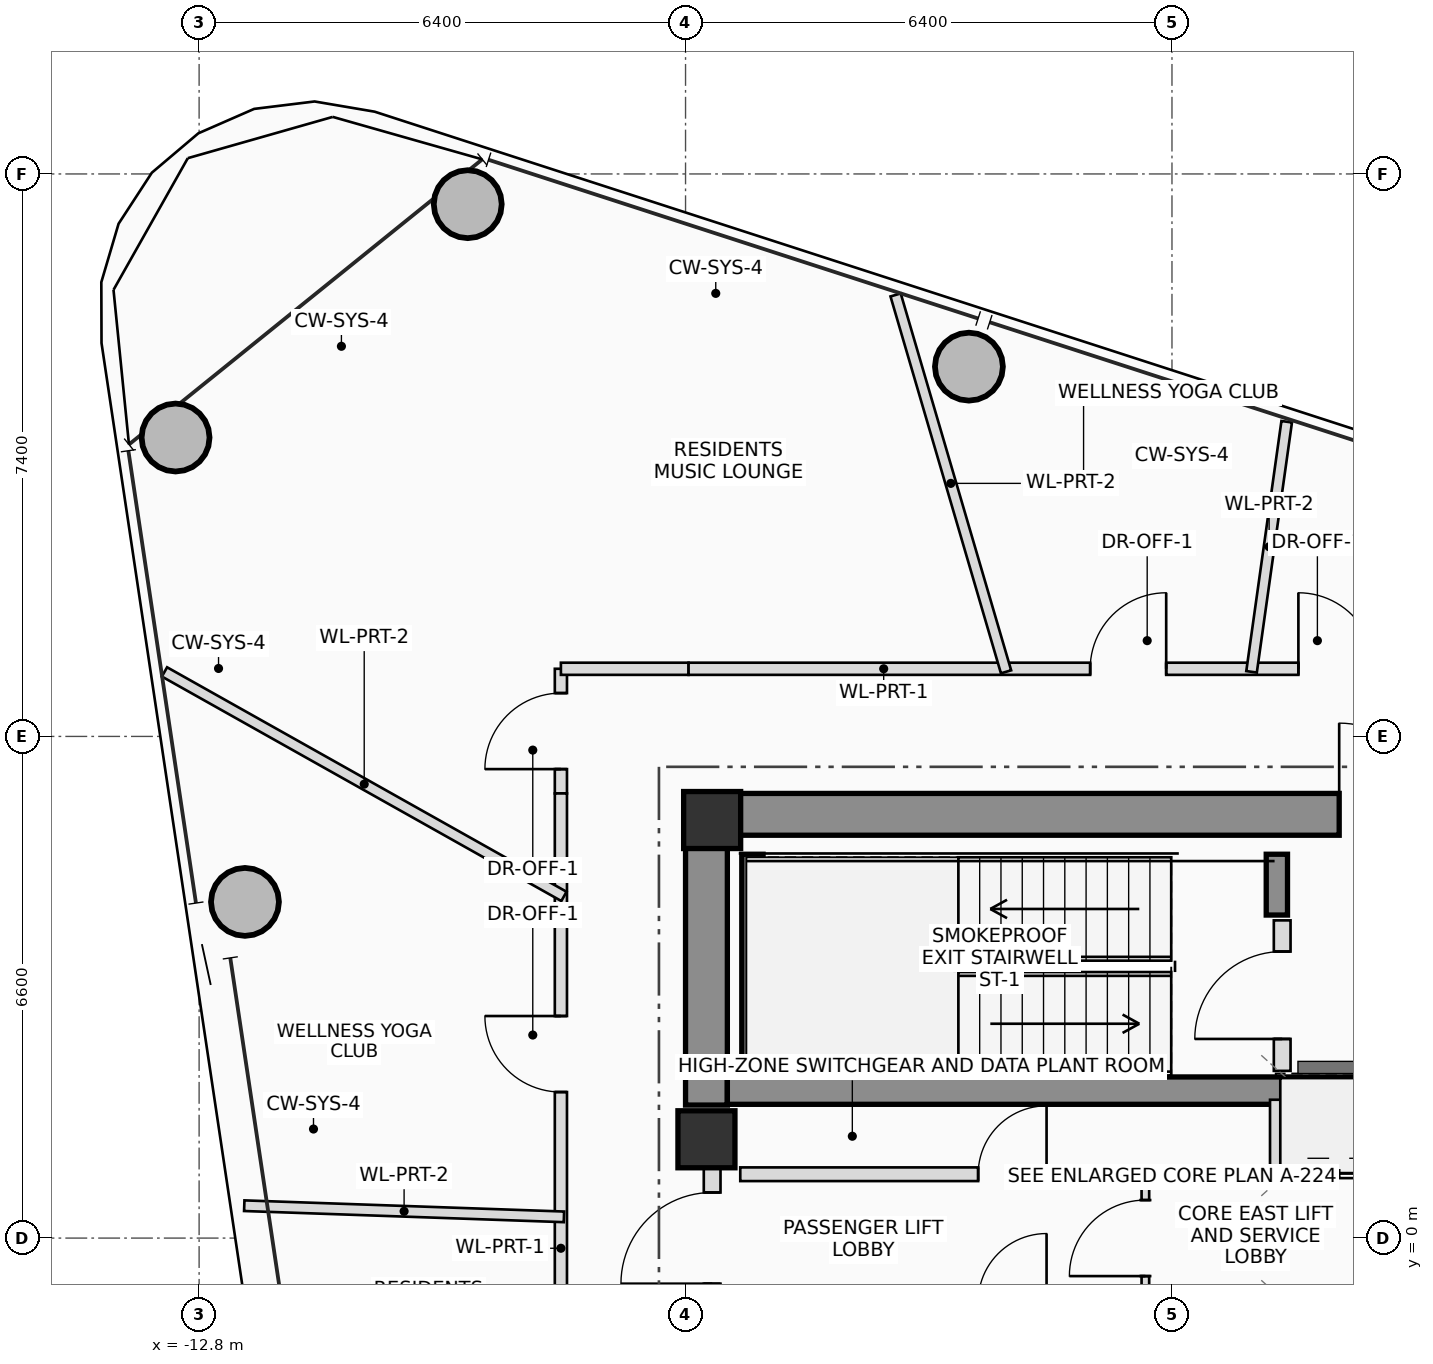
"""IFC4 building model, lengths in metres.
Left out: names, types, materials, properties, quantities, classifications, styles, units other than length and angle.
Written with IfcOpenShell. Run it as: python <this file> out.ifc"""

import sys

from ifc_helpers import new_model, si_unit, direction, frame, frame_2d, origin, origin_2d, place, context, subcontext, project, spatial, rectangle, hollow_circle, extrude, source, transform, mapped, element, fill, save


model = new_model("IFC4")
c1 = context("Model", 3, precision=1e-05, world=origin(), true_north=direction((0.0, 1.0)))
c2 = subcontext(c1, "Body", "Model", "MODEL_VIEW")
j1 = project(units=[si_unit("LENGTHUNIT", "METRE"), si_unit("PLANEANGLEUNIT", "RADIAN")], contexts=[c1])
p1 = place(None, origin())
s1 = spatial("IfcSite", under=j1, at=p1, CompositionType="ELEMENT")
p2 = place(p1, origin())
s2 = spatial("IfcBuilding", under=s1, at=p2, CompositionType="ELEMENT")
p3 = place(p2, frame((0.0, 0.0, 264.35)))
s3 = spatial("IfcBuildingStorey", under=s2, at=p3, CompositionType="ELEMENT", Elevation=264.35)
m1 = source(origin(), c2, "Body", "SweptSolid", [
    extrude(rectangle(XDim=0.75, YDim=0.75, at=origin_2d()), origin(), (0.0, 0.0, 1.0), 3.4),
])
p4 = place(p3, frame((-6.05, 5.5, 0.0), z_axis=(0.0, 0.0, 1.0), x_axis=(1.0, 0.0, 0.0)))
e1 = element("IfcColumn", 1, at=p4, inside=s3, PredefinedType="COLUMN", context=c2, shape_type="MappedRepresentation", body=[
    mapped(m1, transform((0.0, 0.0, 0.0), scale=1.0)),
])
p5 = place(p3, frame((-6.4, 5.575, 0.0), z_axis=(0.0, 0.0, 1.0), x_axis=(1.0, 0.0, 0.0)))
e2 = element("IfcWall", 2, at=p5, inside=s3, PredefinedType="SHEAR", context=c2, shape_type="SweptSolid", body=[
    extrude(rectangle(XDim=12.8, YDim=0.55, at=frame_2d((6.4, 0.0))), origin(), (0.0, 0.0, 1.0), 3.4),
])
p6 = place(p5, frame((8.6, 0.0, 0.0)))
e3 = element("IfcOpeningElement", 3, at=p6, cuts=e2, PredefinedType="OPENING", context=c2, shape_type="SweptSolid", body=[
    extrude(rectangle(XDim=1.2, YDim=2.2, at=frame_2d((0.6, 1.1))), frame((0.0, 0.285, 0.0), z_axis=(0.0, -1.0, 0.0), x_axis=(1.0, 0.0, 0.0)), (0.0, 0.0, 1.0), 0.57),
])
p7 = place(p3, frame((-6.125, 1.75, 0.0), z_axis=(0.0, 0.0, 1.0), x_axis=(0.0, 1.0, 0.0)))
e4 = element("IfcWall", 4, at=p7, inside=s3, PredefinedType="SHEAR", context=c2, shape_type="SweptSolid", body=[
    extrude(rectangle(XDim=3.55, YDim=0.55, at=frame_2d((1.775, 0.0))), origin(), (0.0, 0.0, 1.0), 3.4),
])
p8 = place(p3, frame((-5.85, 1.94, 0.0), z_axis=(0.0, 0.0, 1.0), x_axis=(1.0, 0.0, 0.0)))
e5 = element("IfcWall", 5, at=p8, inside=s3, PredefinedType="SHEAR", context=c2, shape_type="SweptSolid", body=[
    extrude(rectangle(XDim=11.7, YDim=0.36, at=frame_2d((5.85, 0.0))), origin(), (0.0, 0.0, 1.0), 3.4),
])
p9 = place(p3, frame((-5.52, 2.3, 0.0), z_axis=(0.0, 0.0, 1.0), x_axis=(0.0, 1.0, 0.0)))
e6 = element("IfcWall", 6, at=p9, inside=s3, PredefinedType="SHEAR", context=c2, shape_type="SweptSolid", body=[
    extrude(rectangle(XDim=2.75, YDim=0.28, at=frame_2d((1.375, 0.0))), origin(), (0.0, 0.0, 1.0), 3.4),
])
p10 = place(p3, frame((1.38, 4.25, 0.0), z_axis=(0.0, 0.0, 1.0), x_axis=(0.0, 1.0, 0.0)))
e7 = element("IfcWall", 7, at=p10, inside=s3, PredefinedType="SHEAR", context=c2, shape_type="SweptSolid", body=[
    extrude(rectangle(XDim=0.8, YDim=0.28, at=frame_2d((0.4, 0.0))), origin(), (0.0, 0.0, 1.0), 3.4),
])
p11 = place(p3, frame((-6.125, 1.3, 0.0), z_axis=(0.0, 0.0, 1.0), x_axis=(1.0, 0.0, 0.0)))
e8 = element("IfcColumn", 8, at=p11, inside=s3, PredefinedType="COLUMN", context=c2, shape_type="MappedRepresentation", body=[
    mapped(m1, transform((0.0, 0.0, 0.0), scale=1.0)),
])
m2 = source(origin(), c2, "Body", "SweptSolid", [
    extrude(hollow_circle(Radius=0.45, WallThickness=0.032, at=origin_2d()), origin(), (0.0, 0.0, 1.0), 3.4),
])
for number, where, z_axis, x_axis in (
    (9, (-2.672, 11.465, 0.0), (0.0, 0.0, 1.0), (1.0, 0.0, 0.0)),
    (10, (-9.266, 13.602, 0.0), (0.0, 0.0, 1.0), (1.0, 0.0, 0.0)),
    (11, (-13.11, 10.532, 0.0), (0.0, 0.0, 1.0), (1.0, 0.0, 0.0)),
    (12, (-12.197, 4.423, 0.0), (0.0, 0.0, 1.0), (1.0, 0.0, 0.0)),
):
    element("IfcColumn", number, at=place(p3, frame(where, z_axis=z_axis, x_axis=x_axis)), inside=s3, PredefinedType="COLUMN", context=c2, shape_type="MappedRepresentation", body=[
        mapped(m2, transform((0.0, 0.0, 0.0), scale=1.0)),
    ])
p12 = place(p3, frame((-6.05, -0.95, 0.0), z_axis=(0.0, 0.0, 1.0), x_axis=(0.0, 1.0, 0.0)))
e13 = element("IfcWall", 13, at=p12, inside=s3, PredefinedType="PLUMBINGWALL", context=c2, shape_type="SweptSolid", body=[
    extrude(rectangle(XDim=1.9, YDim=0.22, at=frame_2d((0.95, 0.0))), origin(), (0.0, 0.0, 1.0), 2.18),
])
p13 = place(p12, frame((0.35, 0.0, 0.0)))
e14 = element("IfcOpeningElement", 14, at=p13, cuts=e13, PredefinedType="OPENING", context=c2, shape_type="SweptSolid", body=[
    extrude(rectangle(XDim=1.2, YDim=2.2, at=frame_2d((0.6, 1.1))), frame((0.0, 0.12, 0.0), z_axis=(0.0, -1.0, 0.0), x_axis=(1.0, 0.0, 0.0)), (0.0, 0.0, 1.0), 0.24),
])
p14 = place(p3, frame((1.45, 2.2, 0.0), z_axis=(0.0, 0.0, 1.0), x_axis=(0.0, 1.0, 0.0)))
e15 = element("IfcWall", 15, at=p14, inside=s3, PredefinedType="PLUMBINGWALL", context=c2, shape_type="SweptSolid", body=[
    extrude(rectangle(XDim=1.98, YDim=0.22, at=frame_2d((0.99, 0.0))), origin(), (0.0, 0.0, 1.0), 3.2),
])
p15 = place(p14, frame((0.42, 0.0, 0.0)))
e16 = element("IfcOpeningElement", 16, at=p15, cuts=e15, PredefinedType="OPENING", context=c2, shape_type="SweptSolid", body=[
    extrude(rectangle(XDim=1.15, YDim=2.15, at=frame_2d((0.575, 1.075))), frame((0.0, 0.12, 0.0), z_axis=(0.0, -1.0, 0.0), x_axis=(1.0, 0.0, 0.0)), (0.0, 0.0, 1.0), 0.24),
])
p16 = place(p3, frame((-0.35, -0.84, 0.0), z_axis=(0.0, 0.0, 1.0), x_axis=(0.0, 1.0, 0.0)))
e17 = element("IfcWall", 17, at=p16, inside=s3, PredefinedType="PARTITIONING", context=c2, shape_type="SweptSolid", body=[
    extrude(rectangle(XDim=1.68, YDim=0.1, at=frame_2d((0.84, 0.0))), origin(), (0.0, 0.0, 1.0), 3.2),
])
p17 = place(p16, frame((0.34, 0.0, 0.0)))
e18 = element("IfcOpeningElement", 18, at=p17, cuts=e17, PredefinedType="OPENING", context=c2, shape_type="SweptSolid", body=[
    extrude(rectangle(XDim=1.0, YDim=2.25, at=frame_2d((0.5, 1.125))), frame((0.0, 0.06, 0.0), z_axis=(0.0, -1.0, 0.0), x_axis=(1.0, 0.0, 0.0)), (0.0, 0.0, 1.0), 0.12),
])
p18 = place(p3, frame((1.38, 0.84, 0.0), z_axis=(0.0, 0.0, 1.0), x_axis=(0.0, 1.0, 0.0)))
e19 = element("IfcWall", 19, at=p18, inside=s3, PredefinedType="PLUMBINGWALL", context=c2, shape_type="SweptSolid", body=[
    extrude(rectangle(XDim=0.98, YDim=0.18, at=frame_2d((0.49, 0.0))), origin(), (0.0, 0.0, 1.0), 3.2),
])
p19 = place(p3, frame((-5.68, 0.84, 0.0), z_axis=(0.0, 0.0, 1.0), x_axis=(1.0, 0.0, 0.0)))
e20 = element("IfcWall", 20, at=p19, inside=s3, PredefinedType="PLUMBINGWALL", context=c2, shape_type="SweptSolid", body=[
    extrude(rectangle(XDim=11.33, YDim=0.18, at=frame_2d((5.665, 0.0))), origin(), (0.0, 0.0, 1.0), 3.2),
])
p20 = place(p19, frame((3.13, 0.0, 0.0)))
e21 = element("IfcOpeningElement", 21, at=p20, cuts=e20, PredefinedType="OPENING", context=c2, shape_type="SweptSolid", body=[
    extrude(rectangle(XDim=0.9, YDim=2.05, at=frame_2d((0.45, 1.025))), frame((0.0, 0.1, 0.0), z_axis=(0.0, -1.0, 0.0), x_axis=(1.0, 0.0, 0.0)), (0.0, 0.0, 1.0), 0.2),
])
p21 = place(p19, frame((7.33, 0.0, 0.0)))
e22 = element("IfcOpeningElement", 22, at=p21, cuts=e20, PredefinedType="OPENING", context=c2, shape_type="SweptSolid", body=[
    extrude(rectangle(XDim=1.1, YDim=2.2, at=frame_2d((0.55, 1.1))), frame((0.0, 0.1, 0.0), z_axis=(0.0, -1.0, 0.0), x_axis=(1.0, 0.0, 0.0)), (0.0, 0.0, 1.0), 0.2),
])
p22 = place(p19, frame((8.83, 0.0, 0.0)))
e23 = element("IfcOpeningElement", 23, at=p22, cuts=e20, PredefinedType="OPENING", context=c2, shape_type="SweptSolid", body=[
    extrude(rectangle(XDim=1.1, YDim=2.2, at=frame_2d((0.55, 1.1))), frame((0.0, 0.1, 0.0), z_axis=(0.0, -1.0, 0.0), x_axis=(1.0, 0.0, 0.0)), (0.0, 0.0, 1.0), 0.2),
])
p23 = place(p19, frame((10.25, 0.0, 0.0)))
e24 = element("IfcOpeningElement", 24, at=p23, cuts=e20, PredefinedType="OPENING", context=c2, shape_type="SweptSolid", body=[
    extrude(rectangle(XDim=0.9, YDim=2.05, at=frame_2d((0.45, 1.025))), frame((0.0, 0.1, 0.0), z_axis=(0.0, -1.0, 0.0), x_axis=(1.0, 0.0, 0.0)), (0.0, 0.0, 1.0), 0.2),
])
p24 = place(p3, frame((-8.04, 5.85, 0.0), z_axis=(0.0, 0.0, 1.0), x_axis=(0.0, 1.0, 0.0)))
e25 = element("IfcWall", 25, at=p24, inside=s3, PredefinedType="PARTITIONING", context=c2, shape_type="SweptSolid", body=[
    extrude(rectangle(XDim=1.64, YDim=0.16, at=frame_2d((0.82, 0.0))), origin(), (0.0, 0.0, 1.0), 2.605),
])
p25 = place(p24, frame((0.32, 0.0, 0.0)))
e26 = element("IfcOpeningElement", 26, at=p25, cuts=e25, PredefinedType="OPENING", context=c2, shape_type="SweptSolid", body=[
    extrude(rectangle(XDim=1.0, YDim=2.25, at=frame_2d((0.5, 1.125))), frame((0.0, 0.09, 0.0), z_axis=(0.0, -1.0, 0.0), x_axis=(1.0, 0.0, 0.0)), (0.0, 0.0, 1.0), 0.18),
])
p26 = place(p3, frame((-8.04, 7.49, 0.0), z_axis=(0.0, 0.0, 1.0), x_axis=(1.0, 0.0, 0.0)))
e27 = element("IfcWall", 27, at=p26, inside=s3, PredefinedType="PARTITIONING", context=c2, shape_type="SweptSolid", body=[
    extrude(rectangle(XDim=1.68, YDim=0.16, at=frame_2d((0.84, 0.0))), origin(), (0.0, 0.0, 1.0), 2.605),
])
p27 = place(p3, frame((-6.36, 7.49, 0.0), z_axis=(0.0, 0.0, 1.0), x_axis=(1.0, 0.0, 0.0)))
e28 = element("IfcWall", 28, at=p27, inside=s3, PredefinedType="PARTITIONING", context=c2, shape_type="SweptSolid", body=[
    extrude(rectangle(XDim=9.81, YDim=0.16, at=frame_2d((4.905, 0.0))), origin(), (0.0, 0.0, 1.0), 2.605),
])
p28 = place(p27, frame((5.284, 0.0, 0.0)))
e29 = element("IfcOpeningElement", 29, at=p28, cuts=e28, PredefinedType="OPENING", context=c2, shape_type="SweptSolid", body=[
    extrude(rectangle(XDim=1.0, YDim=2.25, at=frame_2d((0.5, 1.125))), frame((0.0, 0.09, 0.0), z_axis=(0.0, -1.0, 0.0), x_axis=(1.0, 0.0, 0.0)), (0.0, 0.0, 1.0), 0.18),
])
p29 = place(p27, frame((8.023, 0.0, 0.0)))
e30 = element("IfcOpeningElement", 30, at=p29, cuts=e28, PredefinedType="OPENING", context=c2, shape_type="SweptSolid", body=[
    extrude(rectangle(XDim=1.0, YDim=2.25, at=frame_2d((0.5, 1.125))), frame((0.0, 0.09, 0.0), z_axis=(0.0, -1.0, 0.0), x_axis=(1.0, 0.0, 0.0)), (0.0, 0.0, 1.0), 0.18),
])
p30 = place(p3, frame((-8.04, -5.85, 0.0), z_axis=(0.0, 0.0, 1.0), x_axis=(0.0, 1.0, 0.0)))
e31 = element("IfcWall", 31, at=p30, inside=s3, PredefinedType="PARTITIONING", context=c2, shape_type="SweptSolid", body=[
    extrude(rectangle(XDim=11.7, YDim=0.16, at=frame_2d((5.85, 0.0))), origin(), (0.0, 0.0, 1.0), 2.605),
])
p31 = place(p30, frame((2.661, 0.0, 0.0)))
e32 = element("IfcOpeningElement", 32, at=p31, cuts=e31, PredefinedType="OPENING", context=c2, shape_type="SweptSolid", body=[
    extrude(rectangle(XDim=1.0, YDim=2.25, at=frame_2d((0.5, 1.125))), frame((0.0, 0.09, 0.0), z_axis=(0.0, -1.0, 0.0), x_axis=(1.0, 0.0, 0.0)), (0.0, 0.0, 1.0), 0.18),
])
p32 = place(p30, frame((7.771, 0.0, 0.0)))
e33 = element("IfcOpeningElement", 33, at=p32, cuts=e31, PredefinedType="OPENING", context=c2, shape_type="SweptSolid", body=[
    extrude(rectangle(XDim=1.0, YDim=2.25, at=frame_2d((0.5, 1.125))), frame((0.0, 0.09, 0.0), z_axis=(0.0, -1.0, 0.0), x_axis=(1.0, 0.0, 0.0)), (0.0, 0.0, 1.0), 0.18),
])
p33 = place(p3, frame((1.047, 7.45, 0.0), z_axis=(0.0, 0.0, 1.0), x_axis=(0.13916814145, 0.990268765743, 0.0)))
e34 = element("IfcWall", 34, at=p33, inside=s3, PredefinedType="PARTITIONING", context=c2, shape_type="SweptSolid", body=[
    extrude(rectangle(XDim=3.323, YDim=0.14, at=frame_2d((1.661, 0.0))), origin(), (0.0, 0.0, 1.0), 2.765),
])
p34 = place(p3, frame((-2.183, 7.45, 0.0), z_axis=(0.0, 0.0, 1.0), x_axis=(-0.281242676509, 0.95963667964, 0.0)))
e35 = element("IfcWall", 35, at=p34, inside=s3, PredefinedType="PARTITIONING", context=c2, shape_type="SweptSolid", body=[
    extrude(rectangle(XDim=5.167, YDim=0.14, at=frame_2d((2.583, 0.0))), origin(), (0.0, 0.0, 1.0), 2.605),
])
p35 = place(p3, frame((-8.0, 4.496, 0.0), z_axis=(0.0, 0.0, 1.0), x_axis=(-0.871799326596, 0.489863179008, 0.0)))
e36 = element("IfcWall", 36, at=p35, inside=s3, PredefinedType="PARTITIONING", context=c2, shape_type="SweptSolid", body=[
    extrude(rectangle(XDim=6.029, YDim=0.14, at=frame_2d((3.014, 0.0))), origin(), (0.0, 0.0, 1.0), 2.605),
])
p36 = place(p3, frame((-8.0, 0.279, 0.0), z_axis=(0.0, 0.0, 1.0), x_axis=(-0.999390047844, 0.034921802229, 0.0)))
e37 = element("IfcWall", 37, at=p36, inside=s3, PredefinedType="PARTITIONING", context=c2, shape_type="SweptSolid", body=[
    extrude(rectangle(XDim=4.209, YDim=0.14, at=frame_2d((2.104, 0.0))), origin(), (0.0, 0.0, 1.0), 2.765),
])
p37 = place(p6, origin())
e38 = element("IfcDoor", 38, at=p37, inside=s3, OperationType="SINGLE_SWING_LEFT", PredefinedType="DOOR", context=c2, shape_type="SweptSolid", body=[
    extrude(rectangle(XDim=1.2, YDim=2.2, at=frame_2d((0.6, 1.1))), frame((0.0, 0.025, 0.0), z_axis=(0.0, -1.0, 0.0), x_axis=(1.0, 0.0, 0.0)), (0.0, 0.0, 1.0), 0.05),
])
fill(e3, e38)
p38 = place(p13, origin())
e39 = element("IfcDoor", 39, at=p38, inside=s3, OperationType="SINGLE_SWING_LEFT", PredefinedType="DOOR", context=c2, shape_type="SweptSolid", body=[
    extrude(rectangle(XDim=1.2, YDim=2.2, at=frame_2d((0.6, 1.1))), frame((0.0, 0.025, 0.0), z_axis=(0.0, -1.0, 0.0), x_axis=(1.0, 0.0, 0.0)), (0.0, 0.0, 1.0), 0.05),
])
fill(e14, e39)
p39 = place(p15, origin())
e40 = element("IfcDoor", 40, at=p39, inside=s3, OperationType="SINGLE_SWING_LEFT", PredefinedType="DOOR", context=c2, shape_type="SweptSolid", body=[
    extrude(rectangle(XDim=1.15, YDim=2.15, at=frame_2d((0.575, 1.075))), frame((0.0, 0.025, 0.0), z_axis=(0.0, -1.0, 0.0), x_axis=(1.0, 0.0, 0.0)), (0.0, 0.0, 1.0), 0.05),
])
fill(e16, e40)
p40 = place(p17, origin())
e41 = element("IfcDoor", 41, at=p40, inside=s3, OperationType="SINGLE_SWING_LEFT", PredefinedType="DOOR", context=c2, shape_type="SweptSolid", body=[
    extrude(rectangle(XDim=1.0, YDim=2.25, at=frame_2d((0.5, 1.125))), frame((0.0, 0.025, 0.0), z_axis=(0.0, -1.0, 0.0), x_axis=(1.0, 0.0, 0.0)), (0.0, 0.0, 1.0), 0.05),
])
fill(e18, e41)
p41 = place(p20, origin())
e42 = element("IfcDoor", 42, at=p41, inside=s3, OperationType="SINGLE_SWING_RIGHT", PredefinedType="DOOR", context=c2, shape_type="SweptSolid", body=[
    extrude(rectangle(XDim=0.9, YDim=2.05, at=frame_2d((0.45, 1.025))), frame((0.0, 0.025, 0.0), z_axis=(0.0, -1.0, 0.0), x_axis=(1.0, 0.0, 0.0)), (0.0, 0.0, 1.0), 0.05),
])
fill(e21, e42)
p42 = place(p21, origin())
e43 = element("IfcDoor", 43, at=p42, inside=s3, OperationType="DOUBLE_DOOR_SLIDING", PredefinedType="DOOR", context=c2, shape_type="SweptSolid", body=[
    extrude(rectangle(XDim=1.1, YDim=2.2, at=frame_2d((0.55, 1.1))), frame((0.0, 0.025, 0.0), z_axis=(0.0, -1.0, 0.0), x_axis=(1.0, 0.0, 0.0)), (0.0, 0.0, 1.0), 0.05),
])
fill(e22, e43)
p43 = place(p25, origin())
e44 = element("IfcDoor", 44, at=p43, inside=s3, OperationType="SINGLE_SWING_LEFT", PredefinedType="DOOR", context=c2, shape_type="SweptSolid", body=[
    extrude(rectangle(XDim=1.0, YDim=2.25, at=frame_2d((0.5, 1.125))), frame((0.0, 0.025, 0.0), z_axis=(0.0, -1.0, 0.0), x_axis=(1.0, 0.0, 0.0)), (0.0, 0.0, 1.0), 0.05),
])
fill(e26, e44)
p44 = place(p28, origin())
e45 = element("IfcDoor", 45, at=p44, inside=s3, OperationType="SINGLE_SWING_RIGHT", PredefinedType="DOOR", context=c2, shape_type="SweptSolid", body=[
    extrude(rectangle(XDim=1.0, YDim=2.25, at=frame_2d((0.5, 1.125))), frame((0.0, 0.025, 0.0), z_axis=(0.0, -1.0, 0.0), x_axis=(1.0, 0.0, 0.0)), (0.0, 0.0, 1.0), 0.05),
])
fill(e29, e45)
p45 = place(p29, origin())
e46 = element("IfcDoor", 46, at=p45, inside=s3, OperationType="SINGLE_SWING_LEFT", PredefinedType="DOOR", context=c2, shape_type="SweptSolid", body=[
    extrude(rectangle(XDim=1.0, YDim=2.25, at=frame_2d((0.5, 1.125))), frame((0.0, 0.025, 0.0), z_axis=(0.0, -1.0, 0.0), x_axis=(1.0, 0.0, 0.0)), (0.0, 0.0, 1.0), 0.05),
])
fill(e30, e46)
p46 = place(p32, origin())
e47 = element("IfcDoor", 47, at=p46, inside=s3, OperationType="SINGLE_SWING_RIGHT", PredefinedType="DOOR", context=c2, shape_type="SweptSolid", body=[
    extrude(rectangle(XDim=1.0, YDim=2.25, at=frame_2d((0.5, 1.125))), frame((0.0, 0.025, 0.0), z_axis=(0.0, -1.0, 0.0), x_axis=(1.0, 0.0, 0.0)), (0.0, 0.0, 1.0), 0.05),
])
fill(e33, e47)
save(model, sys.argv[1])
